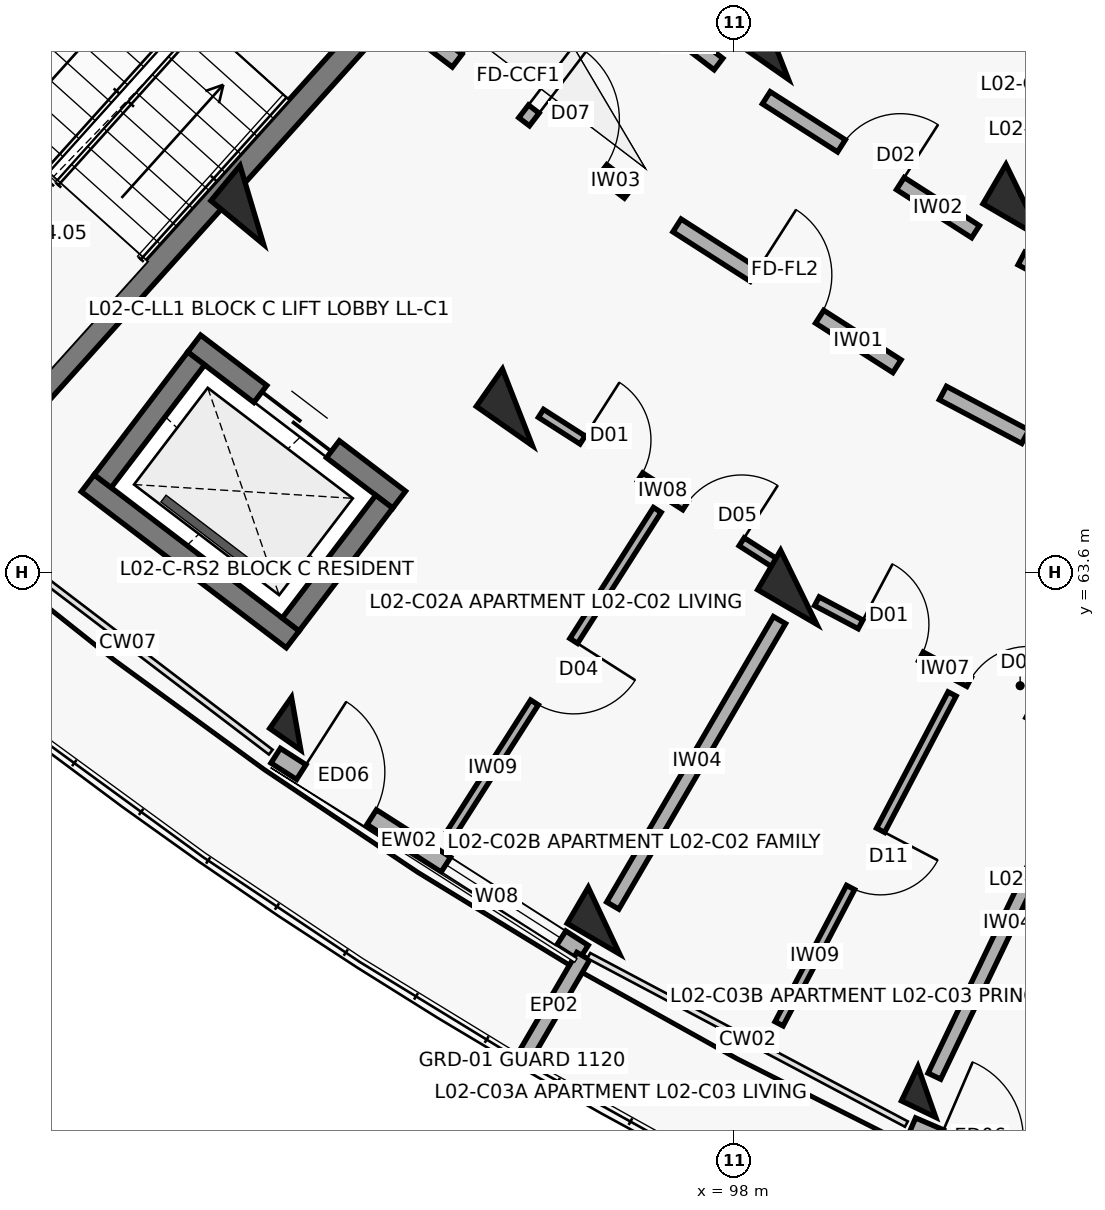
"""IFC4 building model, lengths in metres.
Left out: names, types, materials, properties, quantities, classifications, styles, units other than length and angle.
Written with IfcOpenShell. Run it as: python <this file> out.ifc"""

import sys

from ifc_helpers import new_model, si_unit, direction, frame, frame_2d, origin, origin_2d, place, context, subcontext, project, spatial, rectangle, extrude, element, fill, save


model = new_model("IFC4")
c1 = context("Model", 3, precision=1e-05, world=origin(), true_north=direction((0.0, 1.0)))
c2 = subcontext(c1, "Body", "Model", "MODEL_VIEW")
j1 = project(units=[si_unit("LENGTHUNIT", "METRE"), si_unit("PLANEANGLEUNIT", "RADIAN")], contexts=[c1])
p1 = place(None, origin())
s1 = spatial("IfcSite", under=j1, at=p1, CompositionType="ELEMENT")
p2 = place(p1, origin())
s2 = spatial("IfcBuilding", under=s1, at=p2, CompositionType="ELEMENT")
p3 = place(p2, frame((0.0, 0.0, 8.1)))
s3 = spatial("IfcBuildingStorey", under=s2, at=p3, CompositionType="ELEMENT", Elevation=8.1)
for number, where, z_axis, x_axis in (
    (1, (91.658, 68.43, 0.0), (0.0, 0.0, 1.0), (-0.638, -0.77, 0.0)),
    (2, (98.522, 70.587, 0.0), (0.0, 0.0, 1.0), (-0.573, -0.82, 0.0)),
    (3, (95.152, 65.768, 0.0), (0.0, 0.0, 1.0), (-0.573, -0.82, 0.0)),
):
    element("IfcColumn", number, at=place(p3, frame(where, z_axis=z_axis, x_axis=x_axis)), inside=s3, PredefinedType="COLUMN", context=c2, shape_type="SweptSolid", body=[
        extrude(rectangle(XDim=0.6, YDim=0.9, at=origin_2d()), origin(), (0.0, 0.0, 1.0), 3.1),
    ])
p4 = place(p3, frame((92.241, 61.605, 0.0), z_axis=(0.0, 0.0, 1.0), x_axis=(-0.573004420611, -0.819552276527, 0.0)))
e4 = element("IfcColumn", 4, at=p4, inside=s3, PredefinedType="COLUMN", context=c2, shape_type="SweptSolid", body=[
    extrude(rectangle(XDim=0.5, YDim=0.5, at=origin_2d()), origin(), (0.0, 0.0, 1.0), 3.1),
])
for number, where, z_axis, x_axis in (
    (5, (101.817, 68.478, 0.0), (0.0, 0.0, 1.0), (-0.504, -0.864, 0.0)),
    (6, (98.853, 63.4, 0.0), (0.0, 0.0, 1.0), (-0.504, -0.864, 0.0)),
):
    element("IfcColumn", number, at=place(p3, frame(where, z_axis=z_axis, x_axis=x_axis)), inside=s3, PredefinedType="COLUMN", context=c2, shape_type="SweptSolid", body=[
        extrude(rectangle(XDim=0.6, YDim=0.9, at=origin_2d()), origin(), (0.0, 0.0, 1.0), 3.1),
    ])
p5 = place(p3, frame((96.291, 59.013, 0.0), z_axis=(0.0, 0.0, 1.0), x_axis=(-0.504226211181, -0.863571611366, 0.0)))
e7 = element("IfcColumn", 7, at=p5, inside=s3, PredefinedType="COLUMN", context=c2, shape_type="SweptSolid", body=[
    extrude(rectangle(XDim=0.55, YDim=0.8, at=origin_2d()), origin(), (0.0, 0.0, 1.0), 3.1),
])
p6 = place(p3, frame((100.539, 56.76, 0.0), z_axis=(0.0, 0.0, 1.0), x_axis=(-0.432085748802, -0.901832526405, 0.0)))
e8 = element("IfcColumn", 8, at=p6, inside=s3, PredefinedType="COLUMN", context=c2, shape_type="SweptSolid", body=[
    extrude(rectangle(XDim=0.5, YDim=0.5, at=origin_2d()), origin(), (0.0, 0.0, 1.0), 3.1),
])
p7 = place(p3, frame((91.972, 61.184, 0.0), z_axis=(0.0, 0.0, 1.0), x_axis=(0.84226218024, -0.539068103061, 0.0)))
e9 = element("IfcWall", 9, at=p7, inside=s3, PredefinedType="SOLIDWALL", context=c2, shape_type="SweptSolid", body=[
    extrude(rectangle(XDim=4.809, YDim=0.23, at=frame_2d((2.404, 0.0))), origin(), (0.0, 0.0, 1.0), 2.25),
])
p8 = place(p7, frame((0.4, 0.0, 0.0)))
e10 = element("IfcOpeningElement", 10, at=p8, cuts=e9, PredefinedType="OPENING", context=c2, shape_type="SweptSolid", body=[
    extrude(rectangle(XDim=1.1, YDim=2.15, at=frame_2d((0.55, 1.075))), frame((0.0, 0.125, 0.0), z_axis=(0.0, -1.0, 0.0), x_axis=(1.0, 0.0, 0.0)), (0.0, 0.0, 1.0), 0.25),
])
p9 = place(p7, frame((2.659, 0.0, 0.35)))
e11 = element("IfcOpeningElement", 11, at=p9, cuts=e9, PredefinedType="OPENING", context=c2, shape_type="SweptSolid", body=[
    extrude(rectangle(XDim=1.8, YDim=1.65, at=frame_2d((0.9, 0.825))), frame((0.0, 0.125, 0.0), z_axis=(0.0, -1.0, 0.0), x_axis=(1.0, 0.0, 0.0)), (0.0, 0.0, 1.0), 0.25),
])
p10 = place(p3, frame((96.019, 58.547, 0.0), z_axis=(0.0, 0.0, 1.0), x_axis=(-0.504228145431, -0.863570481985, 0.0)))
e12 = element("IfcWall", 12, at=p10, inside=s3, PredefinedType="PARAPET", context=c2, shape_type="SweptSolid", body=[
    extrude(rectangle(XDim=1.53, YDim=0.195, at=frame_2d((0.765, 0.0))), origin(), (0.0, 0.0, 1.0), 2.25),
])
p11 = place(p3, frame((100.341, 56.301, 0.0), z_axis=(0.0, 0.0, 1.0), x_axis=(0.918737524932, -0.39486878869, 0.0)))
e13 = element("IfcWall", 13, at=p11, inside=s3, PredefinedType="SOLIDWALL", context=c2, shape_type="SweptSolid", body=[
    extrude(rectangle(XDim=4.809, YDim=0.255, at=frame_2d((2.405, 0.0))), origin(), (0.0, 0.0, 1.0), 2.25),
])
p12 = place(p11, frame((0.4, 0.0, 0.0)))
e14 = element("IfcOpeningElement", 14, at=p12, cuts=e13, PredefinedType="OPENING", context=c2, shape_type="SweptSolid", body=[
    extrude(rectangle(XDim=1.1, YDim=2.15, at=frame_2d((0.55, 1.075))), frame((0.0, 0.137, 0.0), z_axis=(0.0, -1.0, 0.0), x_axis=(1.0, 0.0, 0.0)), (0.0, 0.0, 1.0), 0.275),
])
p13 = place(p11, frame((2.659, 0.0, 0.35)))
e15 = element("IfcOpeningElement", 15, at=p13, cuts=e13, PredefinedType="OPENING", context=c2, shape_type="SweptSolid", body=[
    extrude(rectangle(XDim=1.8, YDim=1.65, at=frame_2d((0.9, 0.825))), frame((0.0, 0.137, 0.0), z_axis=(0.0, -1.0, 0.0), x_axis=(1.0, 0.0, 0.0)), (0.0, 0.0, 1.0), 0.275),
])
p14 = place(p3, frame((90.671, 73.287, 0.0), z_axis=(0.0, 0.0, 1.0), x_axis=(-0.668885797871, -0.743365179038, 0.0)))
e16 = element("IfcWall", 16, at=p14, inside=s3, PredefinedType="SHEAR", context=c2, shape_type="SweptSolid", body=[
    extrude(rectangle(XDim=7.69, YDim=0.3, at=frame_2d((3.845, 0.0))), origin(), (0.0, 0.0, 1.0), 3.1),
])
p15 = place(p3, frame((93.325, 70.899, 0.0), z_axis=(0.0, 0.0, 1.0), x_axis=(-0.668868253964, -0.743380964808, 0.0)))
e17 = element("IfcWall", 17, at=p15, inside=s3, PredefinedType="SHEAR", context=c2, shape_type="SweptSolid", body=[
    extrude(rectangle(XDim=7.69, YDim=0.3, at=frame_2d((3.845, 0.0))), origin(), (0.0, 0.0, 1.0), 3.1),
])
p16 = place(p3, frame((90.899, 66.607, 0.0), z_axis=(0.0, 0.0, 1.0), x_axis=(0.795439986025, -0.606032365994, 0.0)))
e18 = element("IfcWall", 18, at=p16, inside=s3, PredefinedType="SHEAR", context=c2, shape_type="SweptSolid", body=[
    extrude(rectangle(XDim=3.39, YDim=0.28, at=frame_2d((1.695, 0.0))), origin(), (0.0, 0.0, 1.0), 3.1),
])
p17 = place(p16, frame((1.095, 0.0, 0.0)))
e19 = element("IfcOpeningElement", 19, at=p17, cuts=e18, PredefinedType="OPENING", context=c2, shape_type="SweptSolid", body=[
    extrude(rectangle(XDim=1.2, YDim=2.15, at=frame_2d((0.6, 1.075))), frame((0.0, 0.15, 0.0), z_axis=(0.0, -1.0, 0.0), x_axis=(1.0, 0.0, 0.0)), (0.0, 0.0, 1.0), 0.3),
])
p18 = place(p3, frame((89.5, 64.77, 0.0), z_axis=(0.0, 0.0, 1.0), x_axis=(0.795474703455, -0.605986795371, 0.0)))
e20 = element("IfcWall", 20, at=p18, inside=s3, PredefinedType="SHEAR", context=c2, shape_type="SweptSolid", body=[
    extrude(rectangle(XDim=3.39, YDim=0.28, at=frame_2d((1.695, 0.0))), origin(), (0.0, 0.0, 1.0), 3.1),
])
p19 = place(p3, frame((90.926, 66.411, 0.0), z_axis=(0.0, 0.0, 1.0), x_axis=(-0.605948992168, -0.795503500238, 0.0)))
e21 = element("IfcWall", 21, at=p19, inside=s3, PredefinedType="SHEAR", context=c2, shape_type="SweptSolid", body=[
    extrude(rectangle(XDim=2.03, YDim=0.28, at=frame_2d((1.015, 0.0))), origin(), (0.0, 0.0, 1.0), 3.1),
])
p20 = place(p3, frame((93.4, 64.526, 0.0), z_axis=(0.0, 0.0, 1.0), x_axis=(-0.605891019062, -0.795547656033, 0.0)))
e22 = element("IfcWall", 22, at=p20, inside=s3, PredefinedType="SHEAR", context=c2, shape_type="SweptSolid", body=[
    extrude(rectangle(XDim=2.03, YDim=0.28, at=frame_2d((1.015, 0.0))), origin(), (0.0, 0.0, 1.0), 3.1),
])
p21 = place(p3, frame((94.001, 70.602, 0.0), z_axis=(0.0, 0.0, 1.0), x_axis=(0.795498026433, -0.605956178235, 0.0)))
e23 = element("IfcWall", 23, at=p21, inside=s3, PredefinedType="SOLIDWALL", context=c2, shape_type="SweptSolid", body=[
    extrude(rectangle(XDim=3.296, YDim=0.21, at=frame_2d((1.648, 0.0))), origin(), (0.0, 0.0, 1.0), 2.08),
])
p22 = place(p21, frame((0.45, 0.0, 0.0)))
e24 = element("IfcOpeningElement", 24, at=p22, cuts=e23, PredefinedType="OPENING", context=c2, shape_type="SweptSolid", body=[
    extrude(rectangle(XDim=1.1, YDim=2.15, at=frame_2d((0.55, 1.075))), frame((0.0, 0.115, 0.0), z_axis=(0.0, -1.0, 0.0), x_axis=(1.0, 0.0, 0.0)), (0.0, 0.0, 1.0), 0.23),
])
p23 = place(p21, frame((1.726, 0.0, 0.0)))
e25 = element("IfcOpeningElement", 25, at=p23, cuts=e23, PredefinedType="OPENING", context=c2, shape_type="SweptSolid", body=[
    extrude(rectangle(XDim=1.12, YDim=2.15, at=frame_2d((0.56, 1.075))), frame((0.0, 0.115, 0.0), z_axis=(0.0, -1.0, 0.0), x_axis=(1.0, 0.0, 0.0)), (0.0, 0.0, 1.0), 0.23),
])
p24 = place(p3, frame((95.309, 72.18, 0.0), z_axis=(0.0, 0.0, 1.0), x_axis=(0.795463961918, -0.606000895453, 0.0)))
e26 = element("IfcWall", 26, at=p24, inside=s3, PredefinedType="SOLIDWALL", context=c2, shape_type="SweptSolid", body=[
    extrude(rectangle(XDim=3.129, YDim=0.19, at=frame_2d((1.564, 0.0))), origin(), (0.0, 0.0, 1.0), 2.08),
])
p25 = place(p24, frame((1.004, 0.0, 0.0)))
e27 = element("IfcOpeningElement", 27, at=p25, cuts=e26, PredefinedType="OPENING", context=c2, shape_type="SweptSolid", body=[
    extrude(rectangle(XDim=1.12, YDim=2.15, at=frame_2d((0.56, 1.075))), frame((0.0, 0.105, 0.0), z_axis=(0.0, -1.0, 0.0), x_axis=(1.0, 0.0, 0.0)), (0.0, 0.0, 1.0), 0.21),
])
p26 = place(p3, frame((97.252, 68.161, 0.0), z_axis=(0.0, 0.0, 1.0), x_axis=(0.842289466461, -0.53902546757, 0.0)))
e28 = element("IfcWall", 28, at=p26, inside=s3, PredefinedType="SOLIDWALL", context=c2, shape_type="SweptSolid", body=[
    extrude(rectangle(XDim=3.436, YDim=0.2, at=frame_2d((1.718, 0.0))), origin(), (0.0, 0.0, 1.0), 2.08),
])
p27 = place(p26, frame((1.208, 0.0, 0.0)))
e29 = element("IfcOpeningElement", 29, at=p27, cuts=e28, PredefinedType="OPENING", context=c2, shape_type="SweptSolid", body=[
    extrude(rectangle(XDim=1.02, YDim=2.15, at=frame_2d((0.51, 1.075))), frame((0.0, 0.11, 0.0), z_axis=(0.0, -1.0, 0.0), x_axis=(1.0, 0.0, 0.0)), (0.0, 0.0, 1.0), 0.22),
])
p28 = place(p3, frame((98.427, 69.841, 0.0), z_axis=(0.0, 0.0, 1.0), x_axis=(0.842280895761, -0.539038860043, 0.0)))
e30 = element("IfcWall", 30, at=p28, inside=s3, PredefinedType="SOLIDWALL", context=c2, shape_type="SweptSolid", body=[
    extrude(rectangle(XDim=3.269, YDim=0.19, at=frame_2d((1.634, 0.0))), origin(), (0.0, 0.0, 1.0), 2.08),
])
p29 = place(p28, frame((1.174, 0.0, 0.0)))
e31 = element("IfcOpeningElement", 31, at=p29, cuts=e30, PredefinedType="OPENING", context=c2, shape_type="SweptSolid", body=[
    extrude(rectangle(XDim=0.92, YDim=2.1, at=frame_2d((0.46, 1.05))), frame((0.0, 0.105, 0.0), z_axis=(0.0, -1.0, 0.0), x_axis=(1.0, 0.0, 0.0)), (0.0, 0.0, 1.0), 0.21),
])
p30 = place(p3, frame((95.462, 65.688, 0.0), z_axis=(0.0, 0.0, 1.0), x_axis=(0.842274914974, -0.539048205271, 0.0)))
e32 = element("IfcWall", 32, at=p30, inside=s3, PredefinedType="PARTITIONING", context=c2, shape_type="SweptSolid", body=[
    extrude(rectangle(XDim=3.785, YDim=0.125, at=frame_2d((1.893, 0.0))), origin(), (0.0, 0.0, 1.0), 2.08),
])
p31 = place(p30, frame((0.65, 0.0, 0.0)))
e33 = element("IfcOpeningElement", 33, at=p31, cuts=e32, PredefinedType="OPENING", context=c2, shape_type="SweptSolid", body=[
    extrude(rectangle(XDim=0.9, YDim=2.1, at=frame_2d((0.45, 1.05))), frame((0.0, 0.073, 0.0), z_axis=(0.0, -1.0, 0.0), x_axis=(1.0, 0.0, 0.0)), (0.0, 0.0, 1.0), 0.145),
])
p32 = place(p30, frame((2.255, 0.0, 0.0)))
e34 = element("IfcOpeningElement", 34, at=p32, cuts=e32, PredefinedType="OPENING", context=c2, shape_type="SweptSolid", body=[
    extrude(rectangle(XDim=0.88, YDim=2.1, at=frame_2d((0.44, 1.05))), frame((0.0, 0.073, 0.0), z_axis=(0.0, -1.0, 0.0), x_axis=(1.0, 0.0, 0.0)), (0.0, 0.0, 1.0), 0.145),
])
p33 = place(p3, frame((96.993, 64.418, 0.0), z_axis=(0.0, 0.0, 1.0), x_axis=(-0.537785480308, -0.843081714409, 0.0)))
e35 = element("IfcWall", 35, at=p33, inside=s3, PredefinedType="PARTITIONING", context=c2, shape_type="SweptSolid", body=[
    extrude(rectangle(XDim=5.05, YDim=0.12, at=frame_2d((2.525, 0.0))), origin(), (0.0, 0.0, 1.0), 2.08),
])
p34 = place(p33, frame((2.045, 0.0, 0.0)))
e36 = element("IfcOpeningElement", 36, at=p34, cuts=e35, PredefinedType="OPENING", context=c2, shape_type="SweptSolid", body=[
    extrude(rectangle(XDim=0.96, YDim=2.1, at=frame_2d((0.48, 1.05))), frame((0.0, 0.07, 0.0), z_axis=(0.0, -1.0, 0.0), x_axis=(1.0, 0.0, 0.0)), (0.0, 0.0, 1.0), 0.14),
])
p35 = place(p3, frame((100.75, 65.956, 0.0), z_axis=(0.0, 0.0, 1.0), x_axis=(0.883440266101, -0.468543803963, 0.0)))
e37 = element("IfcWall", 37, at=p35, inside=s3, PredefinedType="SOLIDWALL", context=c2, shape_type="SweptSolid", body=[
    extrude(rectangle(XDim=3.436, YDim=0.2, at=frame_2d((1.718, 0.0))), origin(), (0.0, 0.0, 1.0), 2.08),
])
p36 = place(p35, frame((1.228, 0.0, 0.0)))
e38 = element("IfcOpeningElement", 38, at=p36, cuts=e37, PredefinedType="OPENING", context=c2, shape_type="SweptSolid", body=[
    extrude(rectangle(XDim=0.98, YDim=2.15, at=frame_2d((0.49, 1.075))), frame((0.0, 0.11, 0.0), z_axis=(0.0, -1.0, 0.0), x_axis=(1.0, 0.0, 0.0)), (0.0, 0.0, 1.0), 0.22),
])
p37 = place(p3, frame((101.784, 67.726, 0.0), z_axis=(0.0, 0.0, 1.0), x_axis=(0.883444301944, -0.468536194293, 0.0)))
e39 = element("IfcWall", 39, at=p37, inside=s3, PredefinedType="SOLIDWALL", context=c2, shape_type="SweptSolid", body=[
    extrude(rectangle(XDim=3.269, YDim=0.19, at=frame_2d((1.634, 0.0))), origin(), (0.0, 0.0, 1.0), 2.08),
])
p38 = place(p37, frame((1.164, 0.0, 0.0)))
e40 = element("IfcOpeningElement", 40, at=p38, cuts=e39, PredefinedType="OPENING", context=c2, shape_type="SweptSolid", body=[
    extrude(rectangle(XDim=0.94, YDim=2.1, at=frame_2d((0.47, 1.05))), frame((0.0, 0.105, 0.0), z_axis=(0.0, -1.0, 0.0), x_axis=(1.0, 0.0, 0.0)), (0.0, 0.0, 1.0), 0.21),
])
p39 = place(p3, frame((99.093, 63.216, 0.0), z_axis=(0.0, 0.0, 1.0), x_axis=(0.883432667361, -0.468558131121, 0.0)))
e41 = element("IfcWall", 41, at=p39, inside=s3, PredefinedType="PARTITIONING", context=c2, shape_type="SweptSolid", body=[
    extrude(rectangle(XDim=3.797, YDim=0.13, at=frame_2d((1.899, 0.0))), origin(), (0.0, 0.0, 1.0), 2.08),
])
p40 = place(p39, frame((0.65, 0.0, 0.0)))
e42 = element("IfcOpeningElement", 42, at=p40, cuts=e41, PredefinedType="OPENING", context=c2, shape_type="SweptSolid", body=[
    extrude(rectangle(XDim=0.9, YDim=2.1, at=frame_2d((0.45, 1.05))), frame((0.0, 0.075, 0.0), z_axis=(0.0, -1.0, 0.0), x_axis=(1.0, 0.0, 0.0)), (0.0, 0.0, 1.0), 0.15),
])
p41 = place(p39, frame((2.267, 0.0, 0.0)))
e43 = element("IfcOpeningElement", 43, at=p41, cuts=e41, PredefinedType="OPENING", context=c2, shape_type="SweptSolid", body=[
    extrude(rectangle(XDim=0.88, YDim=2.1, at=frame_2d((0.44, 1.05))), frame((0.0, 0.075, 0.0), z_axis=(0.0, -1.0, 0.0), x_axis=(1.0, 0.0, 0.0)), (0.0, 0.0, 1.0), 0.15),
])
p42 = place(p3, frame((100.871, 61.996, 0.0), z_axis=(0.0, 0.0, 1.0), x_axis=(-0.464567298878, -0.885537816704, 0.0)))
e44 = element("IfcWall", 44, at=p42, inside=s3, PredefinedType="PARTITIONING", context=c2, shape_type="SweptSolid", body=[
    extrude(rectangle(XDim=4.9, YDim=0.12, at=frame_2d((2.45, 0.0))), origin(), (0.0, 0.0, 1.0), 2.08),
])
p43 = place(p42, frame((2.025, 0.0, 0.0)))
e45 = element("IfcOpeningElement", 45, at=p43, cuts=e44, PredefinedType="OPENING", context=c2, shape_type="SweptSolid", body=[
    extrude(rectangle(XDim=0.85, YDim=2.1, at=frame_2d((0.425, 1.05))), frame((0.0, 0.07, 0.0), z_axis=(0.0, -1.0, 0.0), x_axis=(1.0, 0.0, 0.0)), (0.0, 0.0, 1.0), 0.14),
])
p44 = place(p3, frame((98.601, 62.968, 0.0), z_axis=(0.0, 0.0, 1.0), x_axis=(-0.504216452091, -0.863577309475, 0.0)))
e46 = element("IfcWall", 46, at=p44, inside=s3, PredefinedType="SOLIDWALL", context=c2, shape_type="SweptSolid", body=[
    extrude(rectangle(XDim=4.35, YDim=0.185, at=frame_2d((2.175, 0.0))), origin(), (0.0, 0.0, 1.0), 2.08),
])
p45 = place(p3, frame((102.518, 60.89, 0.0), z_axis=(0.0, 0.0, 1.0), x_axis=(-0.432108769108, -0.901821496561, 0.0)))
e47 = element("IfcWall", 47, at=p45, inside=s3, PredefinedType="SOLIDWALL", context=c2, shape_type="SweptSolid", body=[
    extrude(rectangle(XDim=4.35, YDim=0.185, at=frame_2d((2.175, 0.0))), origin(), (0.0, 0.0, 1.0), 2.08),
])
p46 = place(p8, origin())
e48 = element("IfcDoor", 48, at=p46, inside=s3, OperationType="SINGLE_SWING_LEFT", PredefinedType="DOOR", context=c2, shape_type="SweptSolid", body=[
    extrude(rectangle(XDim=1.1, YDim=2.15, at=frame_2d((0.55, 1.075))), frame((0.0, 0.025, 0.0), z_axis=(0.0, -1.0, 0.0), x_axis=(1.0, 0.0, 0.0)), (0.0, 0.0, 1.0), 0.05),
])
fill(e10, e48)
p47 = place(p9, origin())
e49 = element("IfcWindow", 49, at=p47, inside=s3, PartitioningType="TRIPLE_PANEL_VERTICAL", PredefinedType="WINDOW", context=c2, shape_type="SweptSolid", body=[
    extrude(rectangle(XDim=1.8, YDim=1.65, at=frame_2d((0.9, 0.825))), frame((0.0, 0.03, 0.0), z_axis=(0.0, -1.0, 0.0), x_axis=(1.0, 0.0, 0.0)), (0.0, 0.0, 1.0), 0.06),
])
fill(e11, e49)
p48 = place(p17, origin())
e50 = element("IfcDoor", 50, at=p48, inside=s3, OperationType="DOUBLE_DOOR_SLIDING", PredefinedType="DOOR", context=c2, shape_type="SweptSolid", body=[
    extrude(rectangle(XDim=1.2, YDim=2.15, at=frame_2d((0.6, 1.075))), frame((0.0, 0.025, 0.0), z_axis=(0.0, -1.0, 0.0), x_axis=(1.0, 0.0, 0.0)), (0.0, 0.0, 1.0), 0.05),
])
fill(e19, e50)
p49 = place(p22, origin())
e51 = element("IfcDoor", 51, at=p49, inside=s3, OperationType="SINGLE_SWING_RIGHT", PredefinedType="DOOR", context=c2, shape_type="SweptSolid", body=[
    extrude(rectangle(XDim=1.1, YDim=2.15, at=frame_2d((0.55, 1.075))), frame((0.0, 0.025, 0.0), z_axis=(0.0, -1.0, 0.0), x_axis=(1.0, 0.0, 0.0)), (0.0, 0.0, 1.0), 0.05),
])
fill(e24, e51)
p50 = place(p23, origin())
e52 = element("IfcDoor", 52, at=p50, inside=s3, OperationType="SINGLE_SWING_LEFT", PredefinedType="DOOR", context=c2, shape_type="SweptSolid", body=[
    extrude(rectangle(XDim=1.12, YDim=2.15, at=frame_2d((0.56, 1.075))), frame((0.0, 0.025, 0.0), z_axis=(0.0, -1.0, 0.0), x_axis=(1.0, 0.0, 0.0)), (0.0, 0.0, 1.0), 0.05),
])
fill(e25, e52)
p51 = place(p27, origin())
e53 = element("IfcDoor", 53, at=p51, inside=s3, OperationType="SINGLE_SWING_LEFT", PredefinedType="DOOR", context=c2, shape_type="SweptSolid", body=[
    extrude(rectangle(XDim=1.02, YDim=2.15, at=frame_2d((0.51, 1.075))), frame((0.0, 0.025, 0.0), z_axis=(0.0, -1.0, 0.0), x_axis=(1.0, 0.0, 0.0)), (0.0, 0.0, 1.0), 0.05),
])
fill(e29, e53)
p52 = place(p29, origin())
e54 = element("IfcDoor", 54, at=p52, inside=s3, OperationType="SINGLE_SWING_RIGHT", PredefinedType="DOOR", context=c2, shape_type="SweptSolid", body=[
    extrude(rectangle(XDim=0.92, YDim=2.1, at=frame_2d((0.46, 1.05))), frame((0.0, 0.025, 0.0), z_axis=(0.0, -1.0, 0.0), x_axis=(1.0, 0.0, 0.0)), (0.0, 0.0, 1.0), 0.05),
])
fill(e31, e54)
p53 = place(p31, origin())
e55 = element("IfcDoor", 55, at=p53, inside=s3, OperationType="SINGLE_SWING_LEFT", PredefinedType="DOOR", context=c2, shape_type="SweptSolid", body=[
    extrude(rectangle(XDim=0.9, YDim=2.1, at=frame_2d((0.45, 1.05))), frame((0.0, 0.025, 0.0), z_axis=(0.0, -1.0, 0.0), x_axis=(1.0, 0.0, 0.0)), (0.0, 0.0, 1.0), 0.05),
])
fill(e33, e55)
p54 = place(p32, origin())
e56 = element("IfcDoor", 56, at=p54, inside=s3, OperationType="SINGLE_SWING_RIGHT", PredefinedType="DOOR", context=c2, shape_type="SweptSolid", body=[
    extrude(rectangle(XDim=0.88, YDim=2.1, at=frame_2d((0.44, 1.05))), frame((0.0, 0.025, 0.0), z_axis=(0.0, -1.0, 0.0), x_axis=(1.0, 0.0, 0.0)), (0.0, 0.0, 1.0), 0.05),
])
fill(e34, e56)
p55 = place(p34, origin())
e57 = element("IfcDoor", 57, at=p55, inside=s3, OperationType="SINGLE_SWING_LEFT", PredefinedType="DOOR", context=c2, shape_type="SweptSolid", body=[
    extrude(rectangle(XDim=0.96, YDim=2.1, at=frame_2d((0.48, 1.05))), frame((0.0, 0.025, 0.0), z_axis=(0.0, -1.0, 0.0), x_axis=(1.0, 0.0, 0.0)), (0.0, 0.0, 1.0), 0.05),
])
fill(e36, e57)
p56 = place(p36, origin())
e58 = element("IfcDoor", 58, at=p56, inside=s3, OperationType="SINGLE_SWING_RIGHT", PredefinedType="DOOR", context=c2, shape_type="SweptSolid", body=[
    extrude(rectangle(XDim=0.98, YDim=2.15, at=frame_2d((0.49, 1.075))), frame((0.0, 0.025, 0.0), z_axis=(0.0, -1.0, 0.0), x_axis=(1.0, 0.0, 0.0)), (0.0, 0.0, 1.0), 0.05),
])
fill(e38, e58)
p57 = place(p40, origin())
e59 = element("IfcDoor", 59, at=p57, inside=s3, OperationType="SINGLE_SWING_LEFT", PredefinedType="DOOR", context=c2, shape_type="SweptSolid", body=[
    extrude(rectangle(XDim=0.9, YDim=2.1, at=frame_2d((0.45, 1.05))), frame((0.0, 0.025, 0.0), z_axis=(0.0, -1.0, 0.0), x_axis=(1.0, 0.0, 0.0)), (0.0, 0.0, 1.0), 0.05),
])
fill(e42, e59)
p58 = place(p41, origin())
e60 = element("IfcDoor", 60, at=p58, inside=s3, OperationType="SINGLE_SWING_RIGHT", PredefinedType="DOOR", context=c2, shape_type="SweptSolid", body=[
    extrude(rectangle(XDim=0.88, YDim=2.1, at=frame_2d((0.44, 1.05))), frame((0.0, 0.025, 0.0), z_axis=(0.0, -1.0, 0.0), x_axis=(1.0, 0.0, 0.0)), (0.0, 0.0, 1.0), 0.05),
])
fill(e43, e60)
p59 = place(p43, origin())
e61 = element("IfcDoor", 61, at=p59, inside=s3, OperationType="SINGLE_SWING_LEFT", PredefinedType="DOOR", context=c2, shape_type="SweptSolid", body=[
    extrude(rectangle(XDim=0.85, YDim=2.1, at=frame_2d((0.425, 1.05))), frame((0.0, 0.025, 0.0), z_axis=(0.0, -1.0, 0.0), x_axis=(1.0, 0.0, 0.0)), (0.0, 0.0, 1.0), 0.05),
])
fill(e45, e61)
save(model, sys.argv[1])
